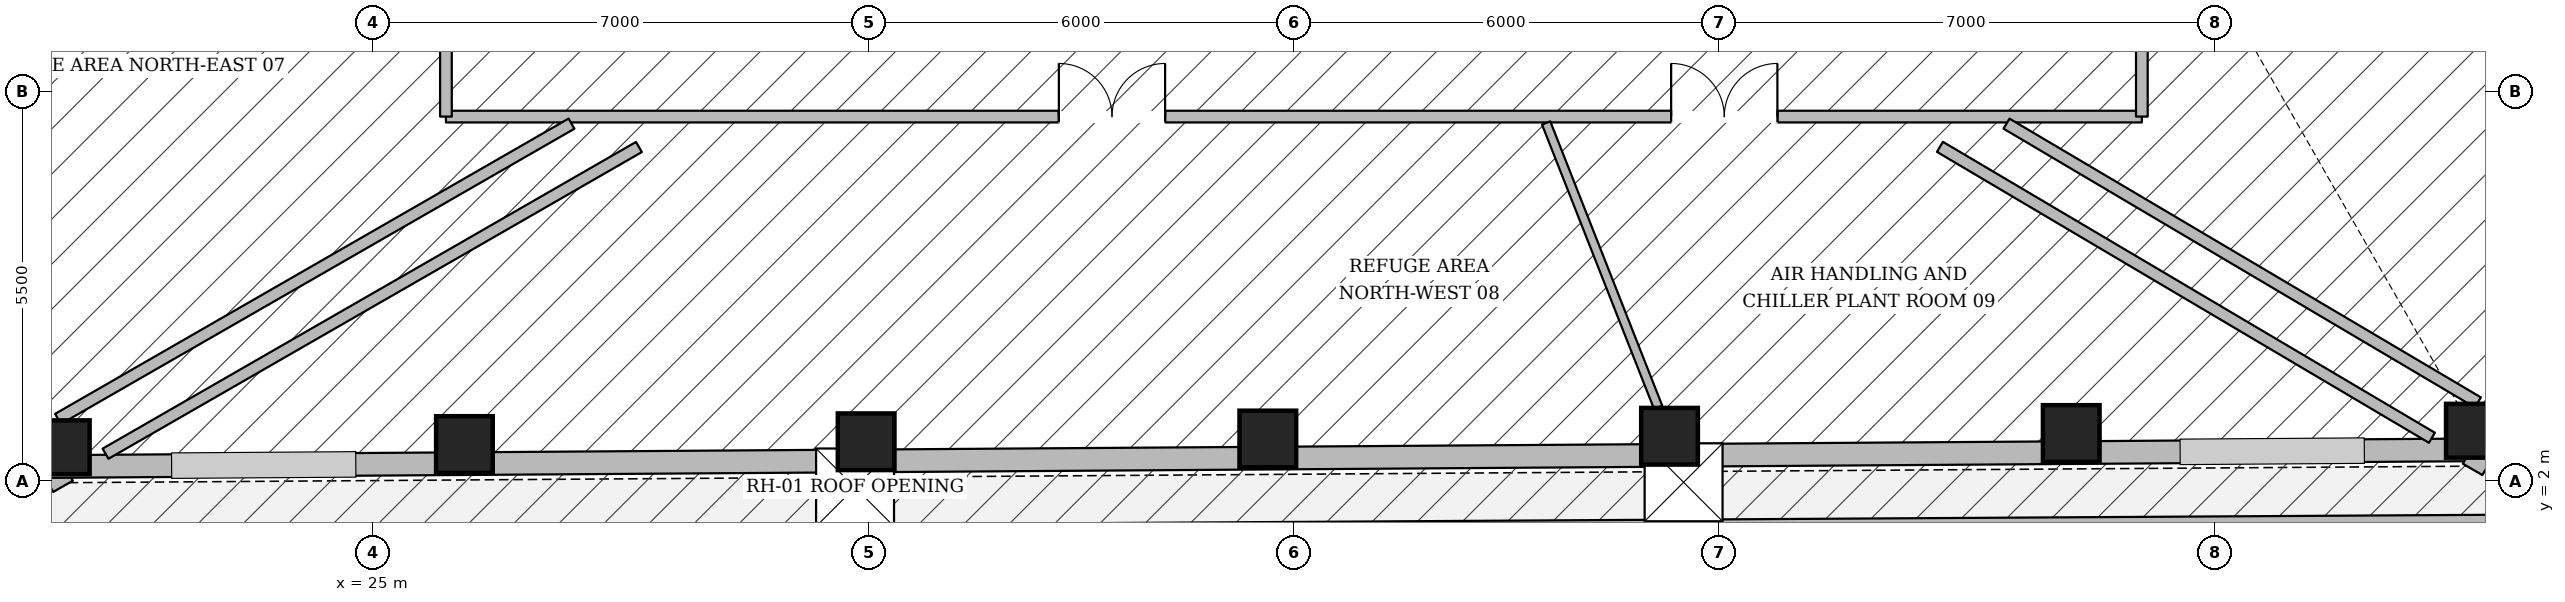
"""IFC4 building model, lengths in metres.
Left out: names, types, materials, properties, quantities, classifications, styles, units other than length and angle.
Written with IfcOpenShell. Run it as: python <this file> out.ifc"""

import sys

from ifc_helpers import new_model, si_unit, direction, frame, frame_2d, origin, origin_2d, place, context, subcontext, project, spatial, rectangle, hollow_rectangle, extrude, element, fill, save


model = new_model("IFC4")
c1 = context("Model", 3, precision=1e-05, world=origin(), true_north=direction((0.0, 1.0)))
c2 = subcontext(c1, "Body", "Model", "MODEL_VIEW")
j1 = project(units=[si_unit("LENGTHUNIT", "METRE"), si_unit("PLANEANGLEUNIT", "RADIAN")], contexts=[c1])
p1 = place(None, origin())
s1 = spatial("IfcSite", under=j1, at=p1, CompositionType="ELEMENT")
p2 = place(p1, origin())
s2 = spatial("IfcBuilding", under=s1, at=p2, CompositionType="ELEMENT")
p3 = place(p2, frame((0.0, 0.0, 75.3)))
s3 = spatial("IfcBuildingStorey", under=s2, at=p3, CompositionType="ELEMENT", Elevation=75.3)
p4 = place(p3, frame((20.62, 2.482, 0.0), z_axis=(0.0, 0.0, 1.0), x_axis=(1.0, 0.0, 0.0)))
e1 = element("IfcColumn", 1, at=p4, inside=s3, PredefinedType="COLUMN", context=c2, shape_type="SweptSolid", body=[
    extrude(hollow_rectangle(XDim=0.76, YDim=0.76, WallThickness=0.035, at=origin_2d()), origin(), (0.0, 0.0, 1.0), 4.985),
])
for number, where, z_axis, x_axis in (
    (2, (26.291, 2.521, 0.0), (0.0, 0.0, 1.0), (1.0, 0.0, 0.0)),
    (3, (31.961, 2.56, 0.0), (0.0, 0.0, 1.0), (1.0, 0.0, 0.0)),
    (4, (37.632, 2.599, 0.0), (0.0, 0.0, 1.0), (1.0, 0.0, 0.0)),
    (5, (43.302, 2.638, 0.0), (0.0, 0.0, 1.0), (1.0, 0.0, 0.0)),
    (6, (48.973, 2.677, 0.0), (0.0, 0.0, 1.0), (1.0, 0.0, 0.0)),
):
    element("IfcColumn", number, at=place(p3, frame(where, z_axis=z_axis, x_axis=x_axis)), inside=s3, PredefinedType="COLUMN", context=c2, shape_type="SweptSolid", body=[
        extrude(hollow_rectangle(XDim=0.8, YDim=0.8, WallThickness=0.036, at=origin_2d()), origin(), (0.0, 0.0, 1.0), 4.985),
    ])
p5 = place(p3, frame((54.644, 2.716, 0.0), z_axis=(0.0, 0.0, 1.0), x_axis=(1.0, 0.0, 0.0)))
e7 = element("IfcColumn", 7, at=p5, inside=s3, PredefinedType="COLUMN", context=c2, shape_type="SweptSolid", body=[
    extrude(hollow_rectangle(XDim=0.76, YDim=0.76, WallThickness=0.035, at=origin_2d()), origin(), (0.0, 0.0, 1.0), 4.985),
])
p6 = place(p3, frame((20.625, 1.931, 0.0), z_axis=(0.0, 0.0, 1.0), x_axis=(-0.497008188636, 0.867745850136, 0.0)))
e8 = element("IfcWall", 8, at=p6, inside=s3, PredefinedType="STANDARD", context=c2, shape_type="SweptSolid", body=[
    extrude(rectangle(XDim=14.0, YDim=0.32, at=frame_2d((7.0, 0.0))), origin(), (0.0, 0.0, 1.0), 3.677),
])
p7 = place(p3, frame((55.119, 2.449, 0.0), z_axis=(0.0, 0.0, 1.0), x_axis=(-0.999976414427, -0.00686808493, 0.0)))
e9 = element("IfcWall", 9, at=p7, inside=s3, PredefinedType="STANDARD", context=c2, shape_type="SweptSolid", body=[
    extrude(rectangle(XDim=34.978, YDim=0.32, at=frame_2d((17.489, 0.0))), origin(), (0.0, 0.0, 1.0), 3.677),
])
p8 = place(p3, frame((61.762, 14.412, 0.0), z_axis=(0.0, 0.0, 1.0), x_axis=(-0.502945792992, -0.864317956143, 0.0)))
e10 = element("IfcWall", 10, at=p8, inside=s3, PredefinedType="STANDARD", context=c2, shape_type="SweptSolid", body=[
    extrude(rectangle(XDim=14.163, YDim=0.32, at=frame_2d((7.082, 0.0))), origin(), (0.0, 0.0, 1.0), 3.677),
])
p9 = place(p3, frame((19.492, 1.198, 0.0), z_axis=(0.0, 0.0, 1.0), x_axis=(0.999982246472, 0.005958753225, 0.0)))
e11 = element("IfcWall", 11, at=p9, inside=s3, PredefinedType="PARAPET", context=c2, shape_type="SweptSolid", body=[
    extrude(rectangle(XDim=36.342, YDim=0.24, at=frame_2d((18.171, 0.0))), origin(), (0.0, 0.0, 1.0), 1.25),
])
p10 = place(p3, frame((26.03, 7.15, 0.0), z_axis=(0.0, 0.0, 1.0), x_axis=(1.0, 0.0, 0.0)))
e12 = element("IfcWall", 12, at=p10, inside=s3, PredefinedType="PARTITIONING", context=c2, shape_type="SweptSolid", body=[
    extrude(rectangle(XDim=23.94, YDim=0.165, at=frame_2d((11.97, 0.0))), origin(), (0.0, 0.0, 1.0), 2.825),
])
p11 = place(p10, frame((8.652, 0.0, 0.0)))
e13 = element("IfcOpeningElement", 13, at=p11, cuts=e12, PredefinedType="OPENING", context=c2, shape_type="SweptSolid", body=[
    extrude(rectangle(XDim=1.5, YDim=2.25, at=frame_2d((0.75, 1.125))), frame((0.0, 0.093, 0.0), z_axis=(0.0, -1.0, 0.0), x_axis=(1.0, 0.0, 0.0)), (0.0, 0.0, 1.0), 0.185),
])
p12 = place(p10, frame((17.295, 0.0, 0.0)))
e14 = element("IfcOpeningElement", 14, at=p12, cuts=e12, PredefinedType="OPENING", context=c2, shape_type="SweptSolid", body=[
    extrude(rectangle(XDim=1.5, YDim=2.25, at=frame_2d((0.75, 1.125))), frame((0.0, 0.093, 0.0), z_axis=(0.0, -1.0, 0.0), x_axis=(1.0, 0.0, 0.0)), (0.0, 0.0, 1.0), 0.185),
])
p13 = place(p3, frame((26.03, 7.15, 0.0), z_axis=(0.0, 0.0, 1.0), x_axis=(0.0, 1.0, 0.0)))
e15 = element("IfcWall", 15, at=p13, inside=s3, PredefinedType="PARTITIONING", context=c2, shape_type="SweptSolid", body=[
    extrude(rectangle(XDim=17.9, YDim=0.165, at=frame_2d((8.95, 0.0))), origin(), (0.0, 0.0, 1.0), 4.985),
])
p14 = place(p13, frame((13.347, 0.0, 0.0)))
e16 = element("IfcOpeningElement", 16, at=p14, cuts=e15, PredefinedType="OPENING", context=c2, shape_type="SweptSolid", body=[
    extrude(rectangle(XDim=1.5, YDim=2.25, at=frame_2d((0.75, 1.125))), frame((0.0, 0.093, 0.0), z_axis=(0.0, -1.0, 0.0), x_axis=(1.0, 0.0, 0.0)), (0.0, 0.0, 1.0), 0.185),
])
p15 = place(p13, frame((6.697, 0.0, 0.0)))
e17 = element("IfcOpeningElement", 17, at=p15, cuts=e15, PredefinedType="OPENING", context=c2, shape_type="SweptSolid", body=[
    extrude(rectangle(XDim=1.5, YDim=2.25, at=frame_2d((0.75, 1.125))), frame((0.0, 0.093, 0.0), z_axis=(0.0, -1.0, 0.0), x_axis=(1.0, 0.0, 0.0)), (0.0, 0.0, 1.0), 0.185),
])
p16 = place(p13, frame((1.147, 0.0, 0.0)))
e18 = element("IfcOpeningElement", 18, at=p16, cuts=e15, PredefinedType="OPENING", context=c2, shape_type="SweptSolid", body=[
    extrude(rectangle(XDim=1.5, YDim=2.25, at=frame_2d((0.75, 1.125))), frame((0.0, 0.093, 0.0), z_axis=(0.0, -1.0, 0.0), x_axis=(1.0, 0.0, 0.0)), (0.0, 0.0, 1.0), 0.185),
])
p17 = place(p3, frame((49.97, 7.15, 0.0), z_axis=(0.0, 0.0, 1.0), x_axis=(0.0, 1.0, 0.0)))
e19 = element("IfcWall", 19, at=p17, inside=s3, PredefinedType="PARTITIONING", context=c2, shape_type="SweptSolid", body=[
    extrude(rectangle(XDim=17.9, YDim=0.165, at=frame_2d((8.95, 0.0))), origin(), (0.0, 0.0, 1.0), 4.673),
])
p18 = place(p17, frame((8.694, 0.0, 0.0)))
e20 = element("IfcOpeningElement", 20, at=p18, cuts=e19, PredefinedType="OPENING", context=c2, shape_type="SweptSolid", body=[
    extrude(rectangle(XDim=1.5, YDim=2.25, at=frame_2d((0.75, 1.125))), frame((0.0, 0.093, 0.0), z_axis=(0.0, -1.0, 0.0), x_axis=(1.0, 0.0, 0.0)), (0.0, 0.0, 1.0), 0.185),
])
p19 = place(p17, frame((1.235, 0.0, 0.0)))
e21 = element("IfcOpeningElement", 21, at=p19, cuts=e19, PredefinedType="OPENING", context=c2, shape_type="SweptSolid", body=[
    extrude(rectangle(XDim=1.5, YDim=2.25, at=frame_2d((0.75, 1.125))), frame((0.0, 0.093, 0.0), z_axis=(0.0, -1.0, 0.0), x_axis=(1.0, 0.0, 0.0)), (0.0, 0.0, 1.0), 0.185),
])
p20 = place(p3, frame((28.754, 6.721, 0.0), z_axis=(0.0, 0.0, 1.0), x_axis=(-0.866925433787, -0.498437851947, 0.0)))
e22 = element("IfcWall", 22, at=p20, inside=s3, PredefinedType="PARTITIONING", context=c2, shape_type="SweptSolid", body=[
    extrude(rectangle(XDim=8.685, YDim=0.165, at=frame_2d((4.343, 0.0))), origin(), (0.0, 0.0, 1.0), 3.68),
])
p21 = place(p3, frame((27.802, 7.05, 0.0), z_axis=(0.0, 0.0, 1.0), x_axis=(-0.866923020548, -0.498442049233, 0.0)))
e23 = element("IfcWall", 23, at=p21, inside=s3, PredefinedType="PARTITIONING", context=c2, shape_type="SweptSolid", body=[
    extrude(rectangle(XDim=8.362, YDim=0.165, at=frame_2d((4.181, 0.0))), origin(), (0.0, 0.0, 1.0), 4.985),
])
p22 = place(p3, frame((48.06, 7.05, 0.0), z_axis=(0.0, 0.0, 1.0), x_axis=(0.860791315367, -0.50895806447, 0.0)))
e24 = element("IfcWall", 24, at=p22, inside=s3, PredefinedType="PARTITIONING", context=c2, shape_type="SweptSolid", body=[
    extrude(rectangle(XDim=7.73, YDim=0.165, at=frame_2d((3.865, 0.0))), origin(), (0.0, 0.0, 1.0), 4.985),
])
p23 = place(p3, frame((47.12, 6.723, 0.0), z_axis=(0.0, 0.0, 1.0), x_axis=(0.860793963914, -0.508953585005, 0.0)))
e25 = element("IfcWall", 25, at=p23, inside=s3, PredefinedType="PARTITIONING", context=c2, shape_type="SweptSolid", body=[
    extrude(rectangle(XDim=8.068, YDim=0.165, at=frame_2d((4.034, 0.0))), origin(), (0.0, 0.0, 1.0), 3.68),
])
p24 = place(p3, frame((41.561, 7.06, 0.0), z_axis=(0.0, 0.0, 1.0), x_axis=(0.366457709217, -0.930434708808, 0.0)))
e26 = element("IfcWall", 26, at=p24, inside=s3, PredefinedType="PARTITIONING", context=c2, shape_type="SweptSolid", body=[
    extrude(rectangle(XDim=4.314, YDim=0.125, at=frame_2d((2.157, 0.0))), origin(), (0.0, 0.0, 1.0), 3.68),
])
p25 = place(p3, frame((0.0, 0.0, -0.22)))
p26 = place(p25, frame((31.805, 1.915, 0.0)))
p27 = place(p26, frame((0.0, 0.0, 0.17)))
e27 = element("IfcWindow", 27, at=p27, inside=s3, PartitioningType="SINGLE_PANEL", PredefinedType="SKYLIGHT", context=c2, shape_type="SweptSolid", body=[
    extrude(rectangle(XDim=1.1, YDim=1.1, at=origin_2d()), origin(), (0.0, 0.0, 1.0), 0.05),
])
p28 = place(p25, frame((43.501, 1.988, 0.0)))
p29 = place(p28, frame((0.0, 0.0, 0.17)))
e28 = element("IfcWindow", 28, at=p29, inside=s3, PartitioningType="SINGLE_PANEL", PredefinedType="SKYLIGHT", context=c2, shape_type="SweptSolid", body=[
    extrude(rectangle(XDim=1.1, YDim=1.1, at=origin_2d()), origin(), (0.0, 0.0, 1.0), 0.05),
])
p30 = place(p11, origin())
e29 = element("IfcDoor", 29, at=p30, inside=s3, OperationType="DOUBLE_DOOR_SINGLE_SWING", PredefinedType="DOOR", context=c2, shape_type="SweptSolid", body=[
    extrude(rectangle(XDim=1.5, YDim=2.25, at=frame_2d((0.75, 1.125))), frame((0.0, 0.025, 0.0), z_axis=(0.0, -1.0, 0.0), x_axis=(1.0, 0.0, 0.0)), (0.0, 0.0, 1.0), 0.05),
])
fill(e13, e29)
p31 = place(p12, origin())
e30 = element("IfcDoor", 30, at=p31, inside=s3, OperationType="DOUBLE_DOOR_SINGLE_SWING", PredefinedType="DOOR", context=c2, shape_type="SweptSolid", body=[
    extrude(rectangle(XDim=1.5, YDim=2.25, at=frame_2d((0.75, 1.125))), frame((0.0, 0.025, 0.0), z_axis=(0.0, -1.0, 0.0), x_axis=(1.0, 0.0, 0.0)), (0.0, 0.0, 1.0), 0.05),
])
fill(e14, e30)
save(model, sys.argv[1])
